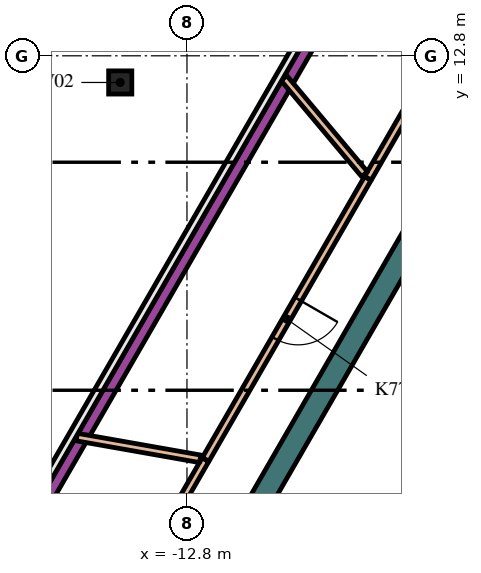
"""IFC4 building model, lengths in metres.
Left out: names, types, materials, properties, quantities, classifications, styles, units other than length and angle.
Written with IfcOpenShell. Run it as: python <this file> out.ifc"""

import sys

from ifc_helpers import new_model, si_unit, direction, frame, frame_2d, origin, origin_2d, place, context, subcontext, project, spatial, rectangle, hollow_circle, extrude, element, fill, save


model = new_model("IFC4")
c1 = context("Model", 3, precision=1e-05, world=origin(), true_north=direction((0.0, 1.0)))
c2 = subcontext(c1, "Body", "Model", "MODEL_VIEW")
j1 = project(units=[si_unit("LENGTHUNIT", "METRE"), si_unit("PLANEANGLEUNIT", "RADIAN")], contexts=[c1])
p1 = place(None, origin())
s1 = spatial("IfcSite", under=j1, at=p1, CompositionType="ELEMENT")
p2 = place(p1, origin())
s2 = spatial("IfcBuilding", under=s1, at=p2, CompositionType="ELEMENT")
p3 = place(p2, frame((0.0, 0.0, 331.8)))
s3 = spatial("IfcBuildingStorey", under=s2, at=p3, CompositionType="ELEMENT", Elevation=331.8)
p4 = place(p3, frame((-14.556, 12.098, 0.0), z_axis=(0.0, 0.0, 1.0), x_axis=(1.0, 0.0, 0.0)))
e1 = element("IfcColumn", 1, at=p4, inside=s3, PredefinedType="COLUMN", context=c2, shape_type="SweptSolid", body=[
    extrude(hollow_circle(Radius=0.305, WallThickness=0.025, at=origin_2d()), origin(), (0.0, 0.0, 1.0), 4.2),
])
p5 = place(p3, frame((-4.652, 11.842, 0.0), z_axis=(0.0, 0.0, 1.0), x_axis=(-0.500003640647, -0.866023301845, 0.0)))
e2 = element("IfcWall", 2, at=p5, inside=s3, PredefinedType="SOLIDWALL", context=c2, shape_type="SweptSolid", body=[
    extrude(rectangle(XDim=15.858, YDim=0.6, at=frame_2d((7.929, 0.0))), origin(), (0.0, 0.0, 1.0), 4.2),
])
p6 = place(p3, frame((-8.06, -1.311, 0.0), z_axis=(0.0, 0.0, 1.0), x_axis=(0.50000273126, 0.866023826885, 0.0)))
e3 = element("IfcWall", 3, at=p6, inside=s3, PredefinedType="SOLIDWALL", context=c2, shape_type="SweptSolid", body=[
    extrude(rectangle(XDim=10.33, YDim=0.25, at=frame_2d((5.165, 0.0))), origin(), (0.0, 0.0, 1.0), 4.2),
])
p7 = place(p3, frame((-12.314, 2.171, 0.0), z_axis=(0.0, 0.0, 1.0), x_axis=(-0.500003092839, -0.866023618125, 0.0)))
e4 = element("IfcWall", 4, at=p7, inside=s3, PredefinedType="PARTITIONING", context=c2, shape_type="SweptSolid", body=[
    extrude(rectangle(XDim=9.84, YDim=0.2, at=frame_2d((4.92, 0.0))), origin(), (0.0, 0.0, 1.0), 3.45),
])
p8 = place(p7, frame((4.32, 0.0, 0.0)))
e5 = element("IfcOpeningElement", 5, at=p8, cuts=e4, PredefinedType="OPENING", context=c2, shape_type="SweptSolid", body=[
    extrude(rectangle(XDim=1.2, YDim=2.1, at=frame_2d((0.6, 1.05))), frame((0.0, 0.11, 0.0), z_axis=(0.0, -1.0, 0.0), x_axis=(1.0, 0.0, 0.0)), (0.0, 0.0, 1.0), 0.22),
])
p9 = place(p3, frame((-3.118, 18.1, 0.0), z_axis=(0.0, 0.0, 1.0), x_axis=(-0.500003092839, -0.866023618125, 0.0)))
e6 = element("IfcWall", 6, at=p9, inside=s3, PredefinedType="PARTITIONING", context=c2, shape_type="SweptSolid", body=[
    extrude(rectangle(XDim=9.84, YDim=0.2, at=frame_2d((4.92, 0.0))), origin(), (0.0, 0.0, 1.0), 3.45),
])
p10 = place(p9, frame((4.32, 0.0, 0.0)))
e7 = element("IfcOpeningElement", 7, at=p10, cuts=e6, PredefinedType="OPENING", context=c2, shape_type="SweptSolid", body=[
    extrude(rectangle(XDim=1.2, YDim=2.1, at=frame_2d((0.6, 1.05))), frame((0.0, 0.11, 0.0), z_axis=(0.0, -1.0, 0.0), x_axis=(1.0, 0.0, 0.0)), (0.0, 0.0, 1.0), 0.22),
])
p11 = place(p3, frame((-8.042, 9.57, 0.0), z_axis=(0.0, 0.0, 1.0), x_axis=(-0.499966798825, -0.866044571643, 0.0)))
e8 = element("IfcWall", 8, at=p11, inside=s3, PredefinedType="PARTITIONING", context=c2, shape_type="SweptSolid", body=[
    extrude(rectangle(XDim=8.534, YDim=0.2, at=frame_2d((4.267, 0.0))), origin(), (0.0, 0.0, 1.0), 3.45),
])
p12 = place(p11, frame((3.667, 0.0, 0.0)))
e9 = element("IfcOpeningElement", 9, at=p12, cuts=e8, PredefinedType="OPENING", context=c2, shape_type="SweptSolid", body=[
    extrude(rectangle(XDim=1.2, YDim=2.1, at=frame_2d((0.6, 1.05))), frame((0.0, 0.11, 0.0), z_axis=(0.0, -1.0, 0.0), x_axis=(1.0, 0.0, 0.0)), (0.0, 0.0, 1.0), 0.22),
])
p13 = place(p3, frame((-15.701, 2.769, 0.0), z_axis=(0.0, 0.0, 1.0), x_axis=(0.984804409481, -0.173667138707, 0.0)))
e10 = element("IfcWall", 10, at=p13, inside=s3, PredefinedType="PARTITIONING", context=c2, shape_type="SweptSolid", body=[
    extrude(rectangle(XDim=3.299, YDim=0.2, at=frame_2d((1.65, 0.0))), origin(), (0.0, 0.0, 1.0), 3.45),
])
p14 = place(p3, frame((-8.127, 9.686, 0.0), z_axis=(0.0, 0.0, 1.0), x_axis=(-0.642778991378, 0.766051674656, 0.0)))
e11 = element("IfcWall", 11, at=p14, inside=s3, PredefinedType="PARTITIONING", context=c2, shape_type="SweptSolid", body=[
    extrude(rectangle(XDim=3.3, YDim=0.2, at=frame_2d((1.65, 0.0))), origin(), (0.0, 0.0, 1.0), 3.45),
])
p15 = place(p3, frame((-7.54, 16.64, 0.0), z_axis=(0.0, 0.0, 1.0), x_axis=(-0.500002158106, -0.866024157798, 0.0)))
e12 = element("IfcWall", 12, at=p15, inside=s3, PredefinedType="SOLIDWALL", context=c2, shape_type="SweptSolid", body=[
    extrude(rectangle(XDim=21.282, YDim=0.3, at=frame_2d((10.641, 0.0))), origin(), (0.0, 0.0, 1.0), 3.45),
])
p16 = place(p12, origin())
e13 = element("IfcDoor", 13, at=p16, inside=s3, OperationType="SINGLE_SWING_RIGHT", PredefinedType="DOOR", context=c2, shape_type="SweptSolid", body=[
    extrude(rectangle(XDim=1.2, YDim=2.1, at=frame_2d((0.6, 1.05))), frame((0.0, 0.025, 0.0), z_axis=(0.0, -1.0, 0.0), x_axis=(1.0, 0.0, 0.0)), (0.0, 0.0, 1.0), 0.05),
])
fill(e9, e13)
save(model, sys.argv[1])
